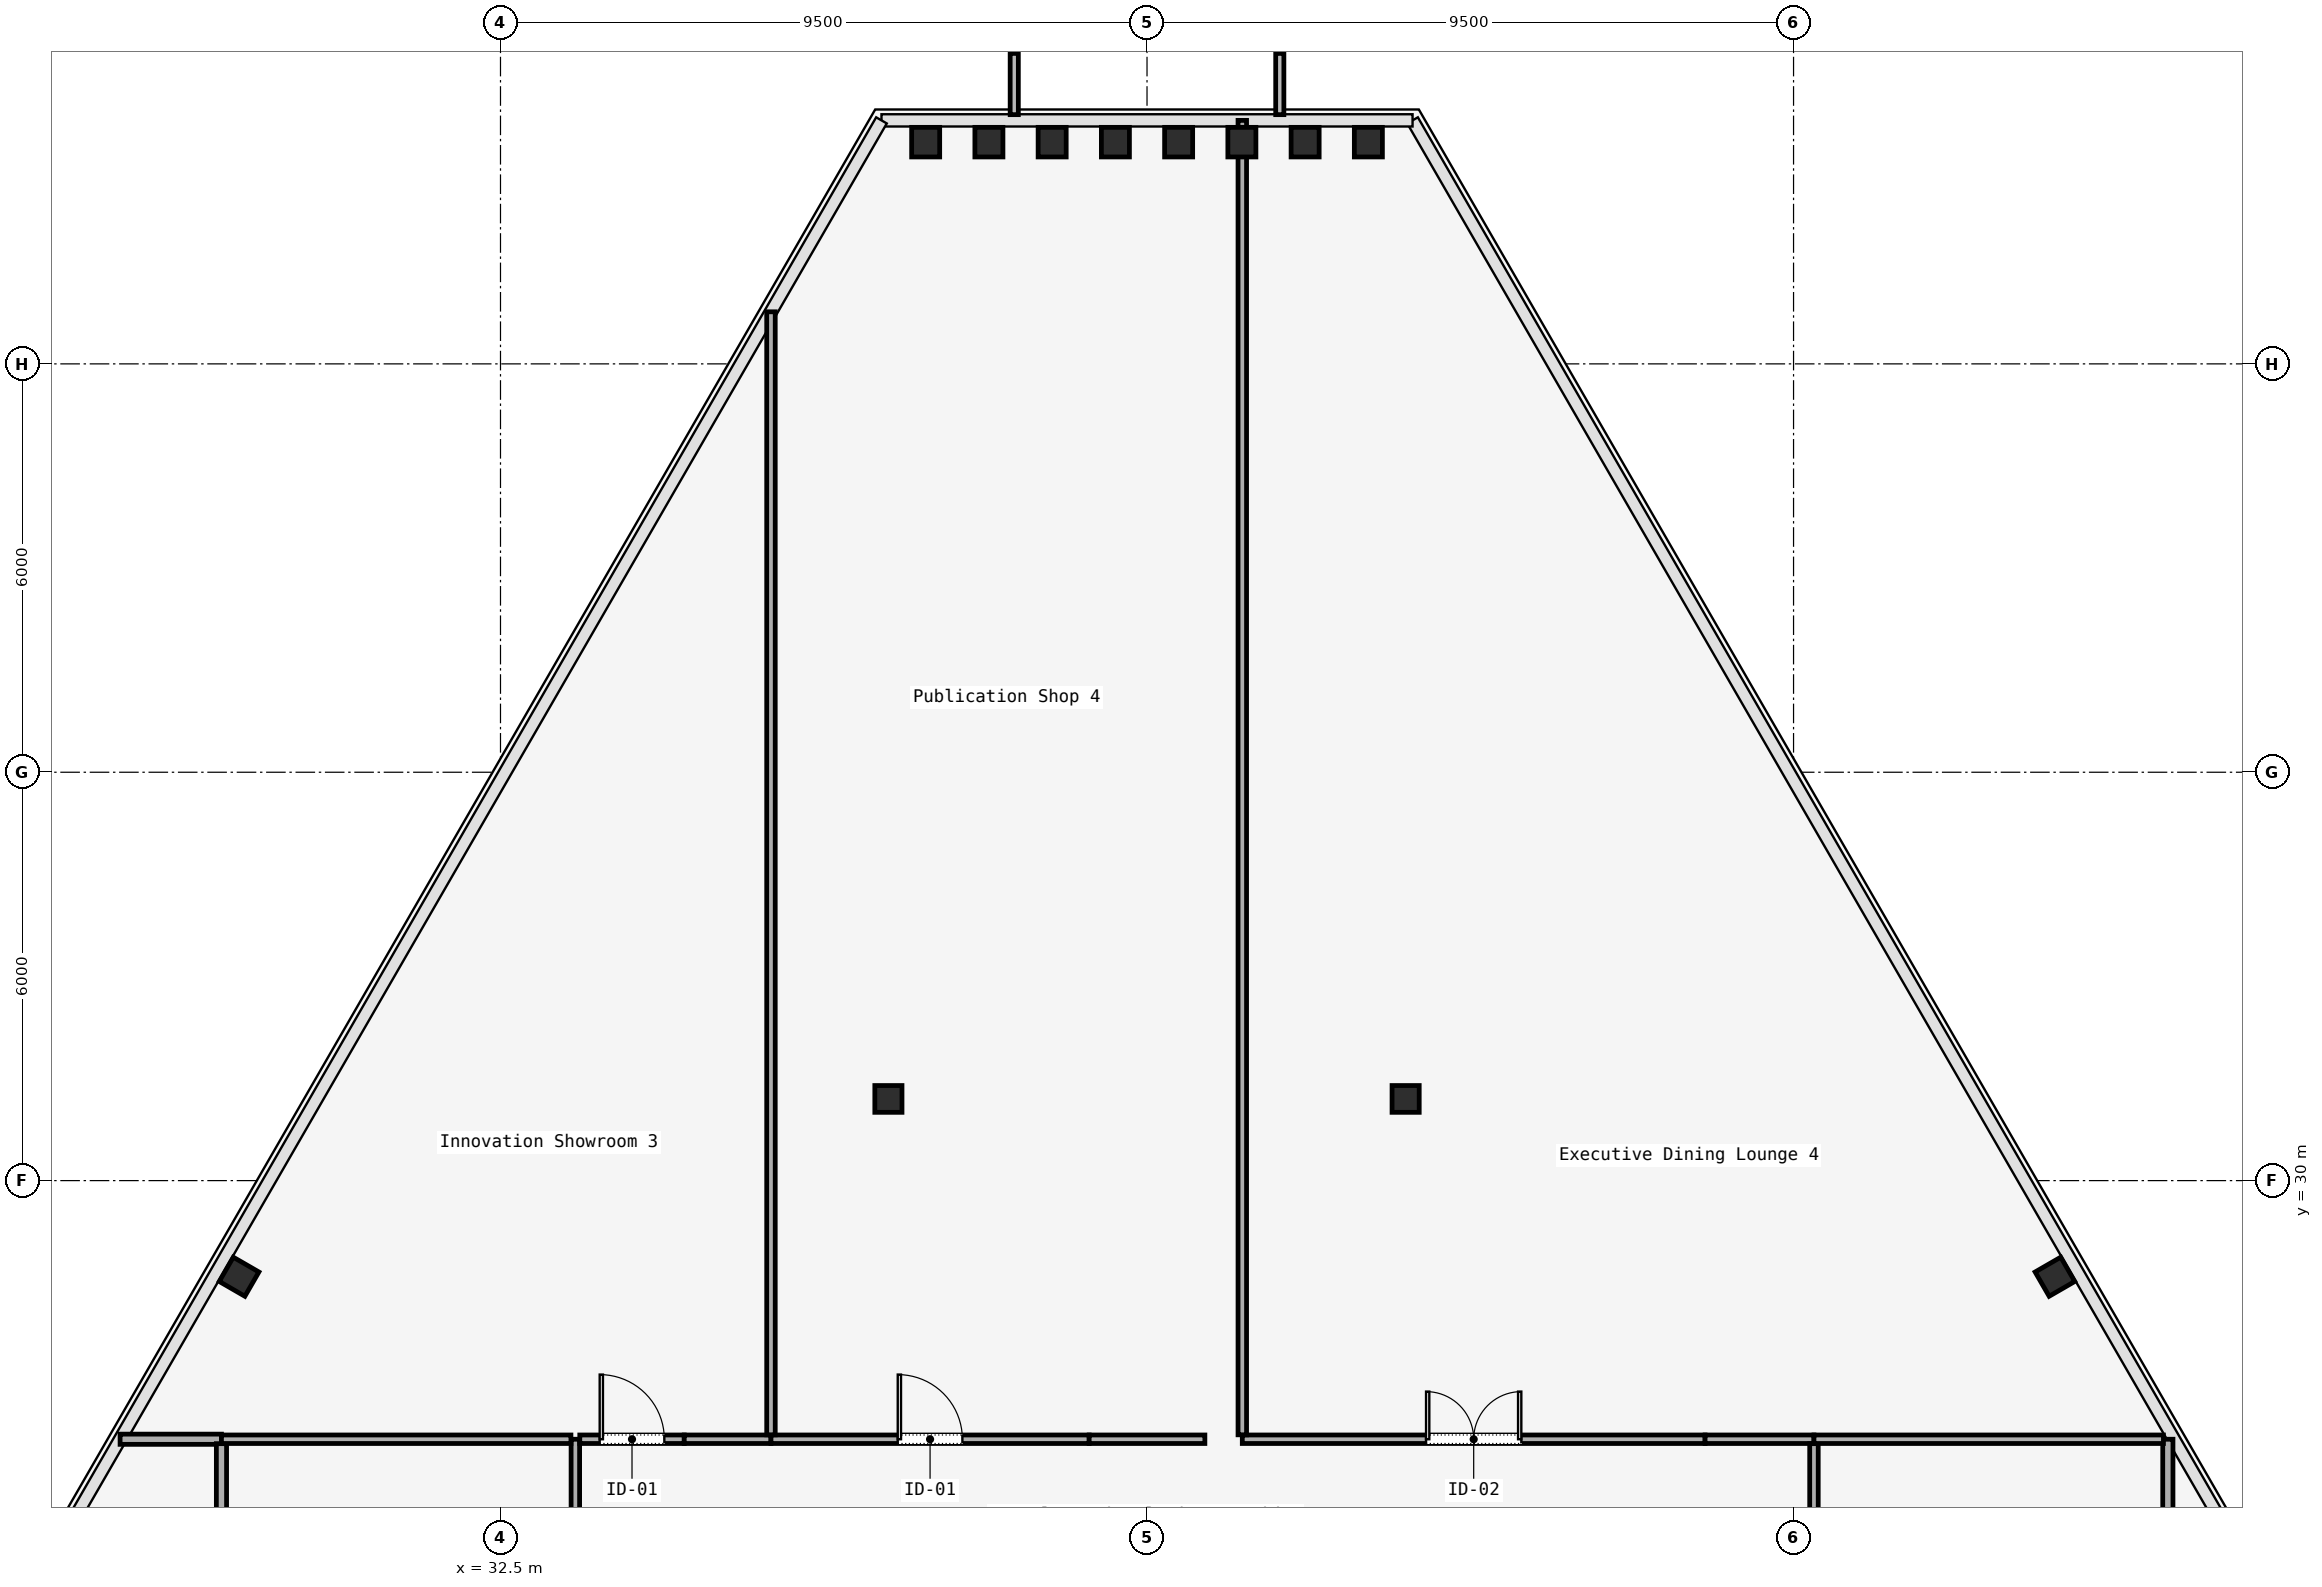
"""IFC4 building model, lengths in metres.
Left out: names, types, materials, properties, quantities, classifications, styles, units other than length and angle.
Written with IfcOpenShell. Run it as: python <this file> out.ifc"""

import sys

from ifc_helpers import new_model, si_unit, direction, frame, frame_2d, origin, origin_2d, place, context, subcontext, project, spatial, rectangle, i_section, extrude, element, fill, save


model = new_model("IFC4")
c1 = context("Model", 3, precision=1e-05, world=origin(), true_north=direction((0.0, 1.0)))
c2 = subcontext(c1, "Body", "Model", "MODEL_VIEW")
j1 = project(units=[si_unit("LENGTHUNIT", "METRE"), si_unit("PLANEANGLEUNIT", "RADIAN")], contexts=[c1])
p1 = place(None, origin())
s1 = spatial("IfcSite", under=j1, at=p1, CompositionType="ELEMENT")
p2 = place(p1, origin())
s2 = spatial("IfcBuilding", under=s1, at=p2, CompositionType="ELEMENT")
p3 = place(p2, frame((0.0, 0.0, 218.0)))
s3 = spatial("IfcBuildingStorey", under=s2, at=p3, CompositionType="ELEMENT", Elevation=218.0)
for number, where, z_axis, x_axis in (
    (1, (38.2, 31.2, 0.0), (0.0, 0.0, 1.0), (1.0, 0.0, 0.0)),
    (2, (45.8, 31.2, 0.0), (0.0, 0.0, 1.0), (1.0, 0.0, 0.0)),
):
    element("IfcColumn", number, at=place(p3, frame(where, z_axis=z_axis, x_axis=x_axis)), inside=s3, PredefinedType="COLUMN", context=c2, shape_type="SweptSolid", body=[
        extrude(i_section(OverallWidth=0.399, OverallDepth=0.394, WebThickness=0.023, FlangeThickness=0.037, FilletRadius=0.015, at=origin_2d()), origin(), (0.0, 0.0, 1.0), 3.58),
    ])
for number, where, z_axis, x_axis in (
    (3, (55.341, 28.588, 0.0), (0.0, 0.0, 1.0), (-0.5, 0.866, 0.0)),
    (4, (45.252, 45.258, 0.0), (0.0, 0.0, 1.0), (1.0, 0.0, 0.0)),
    (5, (44.323, 45.258, 0.0), (0.0, 0.0, 1.0), (1.0, 0.0, 0.0)),
    (6, (43.394, 45.258, 0.0), (0.0, 0.0, 1.0), (1.0, 0.0, 0.0)),
    (7, (42.465, 45.258, 0.0), (0.0, 0.0, 1.0), (1.0, 0.0, 0.0)),
    (8, (41.535, 45.258, 0.0), (0.0, 0.0, 1.0), (1.0, 0.0, 0.0)),
    (9, (40.606, 45.258, 0.0), (0.0, 0.0, 1.0), (1.0, 0.0, 0.0)),
    (10, (39.677, 45.258, 0.0), (0.0, 0.0, 1.0), (1.0, 0.0, 0.0)),
    (11, (38.748, 45.258, 0.0), (0.0, 0.0, 1.0), (1.0, 0.0, 0.0)),
    (12, (28.659, 28.588, 0.0), (0.0, 0.0, 1.0), (0.5, 0.866, 0.0)),
):
    element("IfcColumn", number, at=place(p3, frame(where, z_axis=z_axis, x_axis=x_axis)), inside=s3, PredefinedType="COLUMN", context=c2, shape_type="SweptSolid", body=[
        extrude(i_section(OverallWidth=0.412, OverallDepth=0.435, WebThickness=0.036, FlangeThickness=0.044, FilletRadius=0.015, at=origin_2d()), origin(), (0.0, 0.0, 1.0), 3.58),
    ])
p4 = place(p3, frame((33.6, 24.465, 0.0), z_axis=(0.0, 0.0, 1.0), x_axis=(0.0, 1.0, 0.0)))
e13 = element("IfcWall", 13, at=p4, inside=s3, PredefinedType="PARTITIONING", context=c2, shape_type="SweptSolid", body=[
    extrude(rectangle(XDim=1.735, YDim=0.125, at=frame_2d((0.867, 0.0))), origin(), (0.0, 0.0, 1.0), 3.01),
])
p5 = place(p3, frame((33.665, 26.2, 0.0), z_axis=(0.0, 0.0, 1.0), x_axis=(1.0, 0.0, 0.0)))
e14 = element("IfcWall", 14, at=p5, inside=s3, PredefinedType="PARTITIONING", context=c2, shape_type="SweptSolid", body=[
    extrude(rectangle(XDim=1.535, YDim=0.125, at=frame_2d((0.768, 0.0))), origin(), (0.0, 0.0, 1.0), 3.01),
])
p6 = place(p5, frame((0.292, 0.0, 0.0)))
e15 = element("IfcOpeningElement", 15, at=p6, cuts=e14, PredefinedType="OPENING", context=c2, shape_type="SweptSolid", body=[
    extrude(rectangle(XDim=0.95, YDim=2.2, at=frame_2d((0.475, 1.1))), frame((0.0, 0.062, 0.0), z_axis=(0.0, -1.0, 0.0), x_axis=(1.0, 0.0, 0.0)), (0.0, 0.0, 1.0), 0.125),
])
p7 = place(p3, frame((35.2, 26.2, 0.0), z_axis=(0.0, 0.0, 1.0), x_axis=(1.0, 0.0, 0.0)))
e16 = element("IfcWall", 16, at=p7, inside=s3, PredefinedType="PARTITIONING", context=c2, shape_type="SweptSolid", body=[
    extrude(rectangle(XDim=1.274, YDim=0.125, at=frame_2d((0.637, 0.0))), origin(), (0.0, 0.0, 1.0), 3.01),
])
p8 = place(p3, frame((36.474, 26.2, 0.0), z_axis=(0.0, 0.0, 1.0), x_axis=(1.0, 0.0, 0.0)))
e17 = element("IfcWall", 17, at=p8, inside=s3, PredefinedType="PARTITIONING", context=c2, shape_type="SweptSolid", body=[
    extrude(rectangle(XDim=4.676, YDim=0.125, at=frame_2d((2.338, 0.0))), origin(), (0.0, 0.0, 1.0), 3.01),
])
p9 = place(p8, frame((1.863, 0.0, 0.0)))
e18 = element("IfcOpeningElement", 18, at=p9, cuts=e17, PredefinedType="OPENING", context=c2, shape_type="SweptSolid", body=[
    extrude(rectangle(XDim=0.95, YDim=2.2, at=frame_2d((0.475, 1.1))), frame((0.0, 0.062, 0.0), z_axis=(0.0, -1.0, 0.0), x_axis=(1.0, 0.0, 0.0)), (0.0, 0.0, 1.0), 0.125),
])
p10 = place(p3, frame((41.15, 26.2, 0.0), z_axis=(0.0, 0.0, 1.0), x_axis=(1.0, 0.0, 0.0)))
e19 = element("IfcWall", 19, at=p10, inside=s3, PredefinedType="PARTITIONING", context=c2, shape_type="SweptSolid", body=[
    extrude(rectangle(XDim=1.7, YDim=0.125, at=frame_2d((0.85, 0.0))), origin(), (0.0, 0.0, 1.0), 3.01),
])
p11 = place(p3, frame((43.4, 26.2, 0.0), z_axis=(0.0, 0.0, 1.0), x_axis=(1.0, 0.0, 0.0)))
e20 = element("IfcWall", 20, at=p11, inside=s3, PredefinedType="PARTITIONING", context=c2, shape_type="SweptSolid", body=[
    extrude(rectangle(XDim=6.8, YDim=0.125, at=frame_2d((3.4, 0.0))), origin(), (0.0, 0.0, 1.0), 3.01),
])
p12 = place(p11, frame((2.7, 0.0, 0.0)))
e21 = element("IfcOpeningElement", 21, at=p12, cuts=e20, PredefinedType="OPENING", context=c2, shape_type="SweptSolid", body=[
    extrude(rectangle(XDim=1.4, YDim=2.2, at=frame_2d((0.7, 1.1))), frame((0.0, 0.062, 0.0), z_axis=(0.0, -1.0, 0.0), x_axis=(1.0, 0.0, 0.0)), (0.0, 0.0, 1.0), 0.125),
])
p13 = place(p3, frame((50.2, 26.2, 0.0), z_axis=(0.0, 0.0, 1.0), x_axis=(1.0, 0.0, 0.0)))
e22 = element("IfcWall", 22, at=p13, inside=s3, PredefinedType="PARTITIONING", context=c2, shape_type="SweptSolid", body=[
    extrude(rectangle(XDim=1.6, YDim=0.125, at=frame_2d((0.8, 0.0))), origin(), (0.0, 0.0, 1.0), 3.01),
])
p14 = place(p3, frame((51.8, 26.135, 0.0), z_axis=(0.0, 0.0, 1.0), x_axis=(0.0, -1.0, 0.0)))
e23 = element("IfcWall", 23, at=p14, inside=s3, PredefinedType="PARTITIONING", context=c2, shape_type="SweptSolid", body=[
    extrude(rectangle(XDim=1.735, YDim=0.125, at=frame_2d((0.868, 0.0))), origin(), (0.0, 0.0, 1.0), 3.01),
])
p15 = place(p3, frame((57.0, 17.065, 0.0), z_axis=(0.0, 0.0, 1.0), x_axis=(0.0, 1.0, 0.0)))
e24 = element("IfcWall", 24, at=p15, inside=s3, PredefinedType="PARTITIONING", context=c2, shape_type="SweptSolid", body=[
    extrude(rectangle(XDim=9.135, YDim=0.15, at=frame_2d((4.567, 0.0))), origin(), (0.0, 0.0, 1.0), 3.01),
])
p16 = place(p3, frame((26.91, 26.2, 0.0), z_axis=(0.0, 0.0, 1.0), x_axis=(1.0, 0.0, 0.0)))
e25 = element("IfcWall", 25, at=p16, inside=s3, PredefinedType="PARTITIONING", context=c2, shape_type="SweptSolid", body=[
    extrude(rectangle(XDim=1.49, YDim=0.15, at=frame_2d((0.745, 0.0))), origin(), (0.0, 0.0, 1.0), 3.01),
])
p17 = place(p3, frame((28.4, 26.135, 0.0), z_axis=(0.0, 0.0, 1.0), x_axis=(0.0, -1.0, 0.0)))
e26 = element("IfcWall", 26, at=p17, inside=s3, PredefinedType="PARTITIONING", context=c2, shape_type="SweptSolid", body=[
    extrude(rectangle(XDim=9.07, YDim=0.15, at=frame_2d((4.535, 0.0))), origin(), (0.0, 0.0, 1.0), 3.01),
])
for number, where, z_axis, x_axis in (
    (27, (28.4, 26.2, 0.0), (0.0, 0.0, 1.0), (1.0, 0.0, 0.0)),
    (28, (51.8, 26.2, 0.0), (0.0, 0.0, 1.0), (1.0, 0.0, 0.0)),
):
    element("IfcWall", number, at=place(p3, frame(where, z_axis=z_axis, x_axis=x_axis)), inside=s3, PredefinedType="PARTITIONING", context=c2, shape_type="SweptSolid", body=[
        extrude(rectangle(XDim=5.135, YDim=0.125, at=frame_2d((2.567, 0.0))), origin(), (0.0, 0.0, 1.0), 3.01),
    ])
p18 = place(p3, frame((36.474, 42.765, 0.0), z_axis=(0.0, 0.0, 1.0), x_axis=(0.0, -1.0, 0.0)))
e29 = element("IfcWall", 29, at=p18, inside=s3, PredefinedType="PARTITIONING", context=c2, shape_type="SweptSolid", body=[
    extrude(rectangle(XDim=16.5, YDim=0.125, at=frame_2d((8.25, 0.0))), origin(), (0.0, 0.0, 1.0), 3.01),
])
p19 = place(p3, frame((43.4, 26.265, 0.0), z_axis=(0.0, 0.0, 1.0), x_axis=(0.0, 1.0, 0.0)))
e30 = element("IfcWall", 30, at=p19, inside=s3, PredefinedType="PARTITIONING", context=c2, shape_type="SweptSolid", body=[
    extrude(rectangle(XDim=19.313, YDim=0.125, at=frame_2d((9.656, 0.0))), origin(), (0.0, 0.0, 1.0), 3.01),
])
p20 = place(p6, origin())
e31 = element("IfcDoor", 31, at=p20, inside=s3, OperationType="SINGLE_SWING_RIGHT", PredefinedType="DOOR", context=c2, shape_type="SweptSolid", body=[
    extrude(rectangle(XDim=0.95, YDim=2.2, at=frame_2d((0.475, 1.1))), frame((0.0, 0.025, 0.0), z_axis=(0.0, -1.0, 0.0), x_axis=(1.0, 0.0, 0.0)), (0.0, 0.0, 1.0), 0.05),
])
fill(e15, e31)
p21 = place(p12, origin())
e32 = element("IfcDoor", 32, at=p21, inside=s3, OperationType="SINGLE_SWING_LEFT", PredefinedType="DOOR", context=c2, shape_type="SweptSolid", body=[
    extrude(rectangle(XDim=1.4, YDim=2.2, at=frame_2d((0.7, 1.1))), frame((0.0, 0.025, 0.0), z_axis=(0.0, -1.0, 0.0), x_axis=(1.0, 0.0, 0.0)), (0.0, 0.0, 1.0), 0.05),
])
fill(e21, e32)
p22 = place(p9, origin())
e33 = element("IfcDoor", 33, at=p22, inside=s3, OperationType="SINGLE_SWING_RIGHT", PredefinedType="DOOR", context=c2, shape_type="SweptSolid", body=[
    extrude(rectangle(XDim=0.95, YDim=2.2, at=frame_2d((0.475, 1.1))), frame((0.0, 0.025, 0.0), z_axis=(0.0, -1.0, 0.0), x_axis=(1.0, 0.0, 0.0)), (0.0, 0.0, 1.0), 0.05),
])
fill(e18, e33)
save(model, sys.argv[1])
